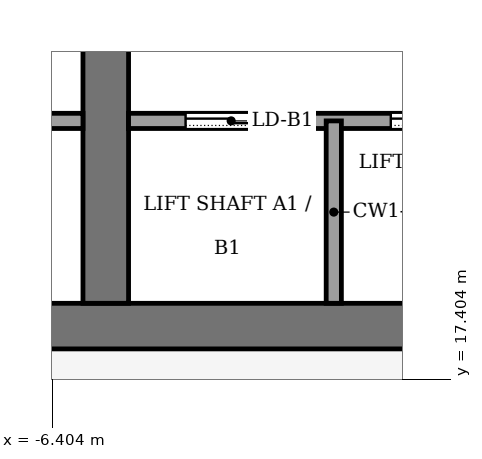
"""IFC4 building model, lengths in metres.
Left out: names, types, materials, properties, quantities, classifications, styles, units other than length and angle.
Written with IfcOpenShell. Run it as: python <this file> out.ifc"""

import sys

from ifc_helpers import new_model, si_unit, direction, frame, frame_2d, origin, place, context, subcontext, project, spatial, rectangle, extrude, element, fill, save


model = new_model("IFC4")
c1 = context("Model", 3, precision=1e-05, world=origin(), true_north=direction((0.0, 1.0)))
c2 = subcontext(c1, "Body", "Model", "MODEL_VIEW")
j1 = project(units=[si_unit("LENGTHUNIT", "METRE"), si_unit("PLANEANGLEUNIT", "RADIAN")], contexts=[c1])
p1 = place(None, origin())
s1 = spatial("IfcSite", under=j1, at=p1, CompositionType="ELEMENT")
p2 = place(p1, origin())
s2 = spatial("IfcBuilding", under=s1, at=p2, CompositionType="ELEMENT")
p3 = place(p2, frame((0.0, 0.0, 306.0)))
s3 = spatial("IfcBuildingStorey", under=s2, at=p3, CompositionType="ELEMENT", Elevation=306.0)
p4 = place(p3, frame((-13.2, 18.1, -0.13), z_axis=(0.0, 0.0, 1.0), x_axis=(1.0, 0.0, 0.0)))
e1 = element("IfcWall", 1, at=p4, inside=s3, PredefinedType="SHEAR", context=c2, shape_type="SweptSolid", body=[
    extrude(rectangle(XDim=26.4, YDim=0.6, at=frame_2d((13.2, 0.0))), origin(), (0.0, 0.0, 1.0), 4.0),
])
p5 = place(p3, frame((-5.7, 18.4, -0.13), z_axis=(0.0, 0.0, 1.0), x_axis=(0.0, 1.0, 0.0)))
e2 = element("IfcWall", 2, at=p5, inside=s3, PredefinedType="SHEAR", context=c2, shape_type="SweptSolid", body=[
    extrude(rectangle(XDim=19.2, YDim=0.6, at=frame_2d((9.6, 0.0))), origin(), (0.0, 0.0, 1.0), 4.0),
])
p6 = place(p5, frame((8.35, 0.0, 0.13)))
e3 = element("IfcOpeningElement", 3, at=p6, cuts=e2, PredefinedType="OPENING", context=c2, shape_type="SweptSolid", body=[
    extrude(rectangle(XDim=0.9, YDim=2.1, at=frame_2d((0.45, 1.05))), frame((0.0, 0.31, 0.0), z_axis=(0.0, -1.0, 0.0), x_axis=(1.0, 0.0, 0.0)), (0.0, 0.0, 1.0), 0.62),
])
p7 = place(p3, frame((-12.6, 20.8, 0.0), z_axis=(0.0, 0.0, 1.0), x_axis=(1.0, 0.0, 0.0)))
e4 = element("IfcWall", 4, at=p7, inside=s3, PredefinedType="PARTITIONING", context=c2, shape_type="SweptSolid", body=[
    extrude(rectangle(XDim=6.6, YDim=0.2, at=frame_2d((3.3, 0.0))), origin(), (0.0, 0.0, 1.0), 3.87),
])
p8 = place(p7, frame((2.8, 0.0, 0.0)))
e5 = element("IfcOpeningElement", 5, at=p8, cuts=e4, PredefinedType="OPENING", context=c2, shape_type="SweptSolid", body=[
    extrude(rectangle(XDim=1.0, YDim=2.1, at=frame_2d((0.5, 1.05))), frame((0.0, 0.11, 0.0), z_axis=(0.0, -1.0, 0.0), x_axis=(1.0, 0.0, 0.0)), (0.0, 0.0, 1.0), 0.22),
])
p9 = place(p3, frame((-5.4, 20.8, 0.0), z_axis=(0.0, 0.0, 1.0), x_axis=(1.0, 0.0, 0.0)))
e6 = element("IfcWall", 6, at=p9, inside=s3, PredefinedType="PARTITIONING", context=c2, shape_type="SweptSolid", body=[
    extrude(rectangle(XDim=10.8, YDim=0.2, at=frame_2d((5.4, 0.0))), origin(), (0.0, 0.0, 1.0), 3.87),
])
p10 = place(p9, frame((0.75, 0.0, 0.0)))
e7 = element("IfcOpeningElement", 7, at=p10, cuts=e6, PredefinedType="OPENING", context=c2, shape_type="SweptSolid", body=[
    extrude(rectangle(XDim=1.2, YDim=2.2, at=frame_2d((0.6, 1.1))), frame((0.0, 0.11, 0.0), z_axis=(0.0, -1.0, 0.0), x_axis=(1.0, 0.0, 0.0)), (0.0, 0.0, 1.0), 0.22),
])
p11 = place(p9, frame((3.45, 0.0, 0.0)))
e8 = element("IfcOpeningElement", 8, at=p11, cuts=e6, PredefinedType="OPENING", context=c2, shape_type="SweptSolid", body=[
    extrude(rectangle(XDim=1.2, YDim=2.2, at=frame_2d((0.6, 1.1))), frame((0.0, 0.11, 0.0), z_axis=(0.0, -1.0, 0.0), x_axis=(1.0, 0.0, 0.0)), (0.0, 0.0, 1.0), 0.22),
])
p12 = place(p9, frame((6.15, 0.0, 0.0)))
e9 = element("IfcOpeningElement", 9, at=p12, cuts=e6, PredefinedType="OPENING", context=c2, shape_type="SweptSolid", body=[
    extrude(rectangle(XDim=1.2, YDim=2.2, at=frame_2d((0.6, 1.1))), frame((0.0, 0.11, 0.0), z_axis=(0.0, -1.0, 0.0), x_axis=(1.0, 0.0, 0.0)), (0.0, 0.0, 1.0), 0.22),
])
p13 = place(p9, frame((8.85, 0.0, 0.0)))
e10 = element("IfcOpeningElement", 10, at=p13, cuts=e6, PredefinedType="OPENING", context=c2, shape_type="SweptSolid", body=[
    extrude(rectangle(XDim=1.2, YDim=2.2, at=frame_2d((0.6, 1.1))), frame((0.0, 0.11, 0.0), z_axis=(0.0, -1.0, 0.0), x_axis=(1.0, 0.0, 0.0)), (0.0, 0.0, 1.0), 0.22),
])
p14 = place(p3, frame((-2.7, 18.4, 0.0), z_axis=(0.0, 0.0, 1.0), x_axis=(0.0, 1.0, 0.0)))
e11 = element("IfcWall", 11, at=p14, inside=s3, PredefinedType="PARTITIONING", context=c2, shape_type="SweptSolid", body=[
    extrude(rectangle(XDim=2.4, YDim=0.2, at=frame_2d((1.2, 0.0))), origin(), (0.0, 0.0, 1.0), 3.87),
])
p15 = place(p10, origin())
e12 = element("IfcDoor", 12, at=p15, inside=s3, OperationType="SLIDING_TO_LEFT", PredefinedType="DOOR", context=c2, shape_type="SweptSolid", body=[
    extrude(rectangle(XDim=1.2, YDim=2.2, at=frame_2d((0.6, 1.1))), frame((0.0, 0.025, 0.0), z_axis=(0.0, -1.0, 0.0), x_axis=(1.0, 0.0, 0.0)), (0.0, 0.0, 1.0), 0.05),
])
fill(e7, e12)
p16 = place(p11, origin())
e13 = element("IfcDoor", 13, at=p16, inside=s3, OperationType="SLIDING_TO_LEFT", PredefinedType="DOOR", context=c2, shape_type="SweptSolid", body=[
    extrude(rectangle(XDim=1.2, YDim=2.2, at=frame_2d((0.6, 1.1))), frame((0.0, 0.025, 0.0), z_axis=(0.0, -1.0, 0.0), x_axis=(1.0, 0.0, 0.0)), (0.0, 0.0, 1.0), 0.05),
])
fill(e8, e13)
save(model, sys.argv[1])
